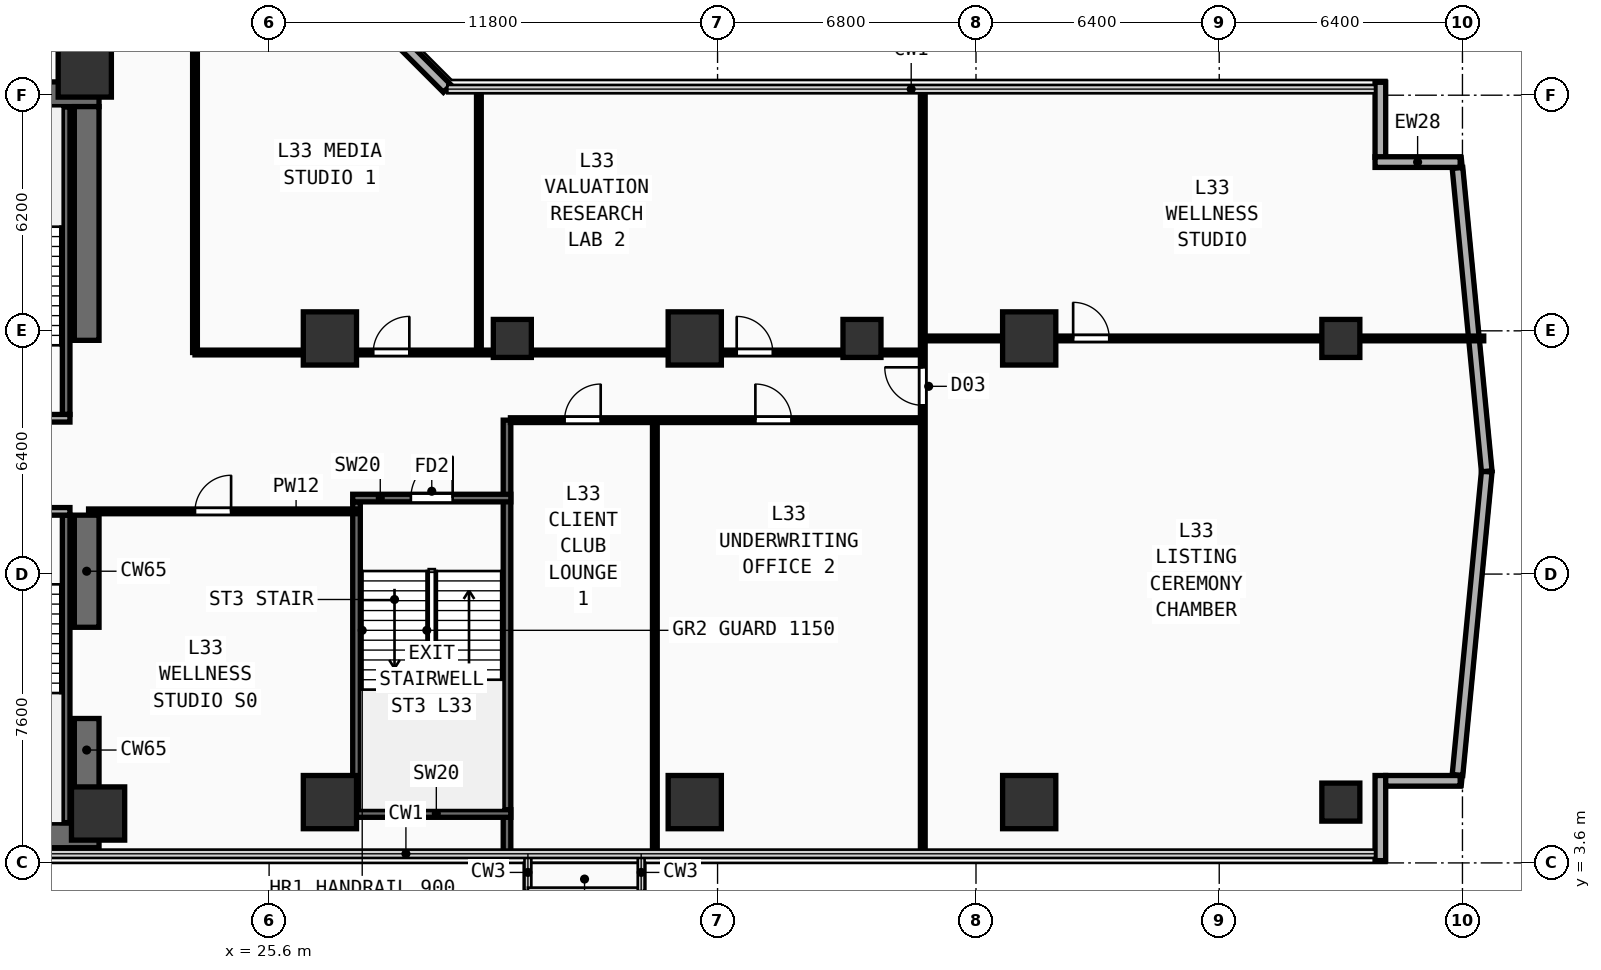
"""IFC4 building model, lengths in metres.
Left out: names, types, materials, properties, quantities, classifications, styles, units other than length and angle.
Written with IfcOpenShell. Run it as: python <this file> out.ifc"""

import sys

from ifc_helpers import new_model, si_unit, direction, frame, frame_2d, origin, origin_2d, place, context, subcontext, project, spatial, rectangle, extrude, element, fill, save


model = new_model("IFC4")
c1 = context("Model", 3, precision=1e-05, world=origin(), true_north=direction((0.0, 1.0)))
c2 = subcontext(c1, "Body", "Model", "MODEL_VIEW")
j1 = project(units=[si_unit("LENGTHUNIT", "METRE"), si_unit("PLANEANGLEUNIT", "RADIAN")], contexts=[c1])
p1 = place(None, origin())
s1 = spatial("IfcSite", under=j1, at=p1, CompositionType="ELEMENT")
p2 = place(p1, origin())
s2 = spatial("IfcBuilding", under=s1, at=p2, CompositionType="ELEMENT")
p3 = place(p2, frame((0.0, 0.0, 129.7)))
s3 = spatial("IfcBuildingStorey", under=s2, at=p3, CompositionType="ELEMENT", Elevation=129.7)
for number, where, z_axis, x_axis in (
    (1, (7.125, 4.325, 0.0), (0.0, 0.0, 1.0), (1.0, 0.0, 0.0)),
    (2, (7.125, 23.825, 0.0), (0.0, 0.0, 1.0), (1.0, 0.0, 0.0)),
):
    element("IfcWall", number, at=place(p3, frame(where, z_axis=z_axis, x_axis=x_axis)), inside=s3, PredefinedType="SHEAR", context=c2, shape_type="SweptSolid", body=[
        extrude(rectangle(XDim=14.0, YDim=0.65, at=frame_2d((7.0, 0.0))), origin(), (0.0, 0.0, 1.0), 3.54),
    ])
p4 = place(p3, frame((20.8, 4.65, 0.0), z_axis=(0.0, 0.0, 1.0), x_axis=(0.0, 1.0, 0.0)))
e3 = element("IfcWall", 3, at=p4, inside=s3, PredefinedType="SHEAR", context=c2, shape_type="SweptSolid", body=[
    extrude(rectangle(XDim=2.75, YDim=0.65, at=frame_2d((1.375, 0.0))), origin(), (0.0, 0.0, 1.0), 3.54),
])
p5 = place(p3, frame((20.8, 9.8, 0.0), z_axis=(0.0, 0.0, 1.0), x_axis=(0.0, 1.0, 0.0)))
e4 = element("IfcWall", 4, at=p5, inside=s3, PredefinedType="SHEAR", context=c2, shape_type="SweptSolid", body=[
    extrude(rectangle(XDim=2.95, YDim=0.65, at=frame_2d((1.475, 0.0))), origin(), (0.0, 0.0, 1.0), 3.54),
])
p6 = place(p3, frame((20.8, 17.35, 0.0), z_axis=(0.0, 0.0, 1.0), x_axis=(0.0, 1.0, 0.0)))
e5 = element("IfcWall", 5, at=p6, inside=s3, PredefinedType="SHEAR", context=c2, shape_type="SweptSolid", body=[
    extrude(rectangle(XDim=6.15, YDim=0.65, at=frame_2d((3.075, 0.0))), origin(), (0.0, 0.0, 1.0), 3.54),
])
for number, where, z_axis, x_axis in (
    (6, (21.1, 4.9, 0.0), (0.0, 0.0, 1.0), (1.0, 0.0, 0.0)),
    (7, (20.75, 24.45, 0.0), (0.0, 0.0, 1.0), (1.0, 0.0, 0.0)),
    (8, (27.2, 5.2, 0.0), (0.0, 0.0, 1.0), (1.0, 0.0, 0.0)),
    (9, (36.8, 5.2, 0.0), (0.0, 0.0, 1.0), (1.0, 0.0, 0.0)),
    (10, (45.6, 5.2, 0.0), (0.0, 0.0, 1.0), (1.0, 0.0, 0.0)),
    (11, (27.2, 17.4, 0.0), (0.0, 0.0, 1.0), (1.0, 0.0, 0.0)),
    (12, (36.8, 17.4, 0.0), (0.0, 0.0, 1.0), (1.0, 0.0, 0.0)),
    (13, (45.6, 17.4, 0.0), (0.0, 0.0, 1.0), (1.0, 0.0, 0.0)),
):
    element("IfcColumn", number, at=place(p3, frame(where, z_axis=z_axis, x_axis=x_axis)), inside=s3, PredefinedType="COLUMN", context=c2, shape_type="SweptSolid", body=[
        extrude(rectangle(XDim=1.4, YDim=1.4, at=origin_2d()), origin(), (0.0, 0.0, 1.0), 3.54),
    ])
for number, where, z_axis, x_axis in (
    (14, (53.8, 5.2, 0.0), (0.0, 0.0, 1.0), (1.0, 0.0, 0.0)),
    (15, (53.8, 17.4, 0.0), (0.0, 0.0, 1.0), (1.0, 0.0, 0.0)),
    (16, (32.0, 17.4, 0.0), (0.0, 0.0, 1.0), (1.0, 0.0, 0.0)),
    (17, (41.2, 17.4, 0.0), (0.0, 0.0, 1.0), (1.0, 0.0, 0.0)),
):
    element("IfcColumn", number, at=place(p3, frame(where, z_axis=z_axis, x_axis=x_axis)), inside=s3, PredefinedType="COLUMN", context=c2, shape_type="SweptSolid", body=[
        extrude(rectangle(XDim=1.0, YDim=1.0, at=origin_2d()), origin(), (0.0, 0.0, 1.0), 3.54),
    ])
p7 = place(p3, frame((54.84, 3.66, 0.0), z_axis=(0.0, 0.0, 1.0), x_axis=(0.0, 1.0, 0.0)))
e18 = element("IfcWall", 18, at=p7, inside=s3, PredefinedType="SOLIDWALL", context=c2, shape_type="SweptSolid", body=[
    extrude(rectangle(XDim=2.24, YDim=0.28, at=frame_2d((1.12, 0.0))), origin(), (0.0, 0.0, 1.0), 3.54),
])
p8 = place(p3, frame((54.98, 5.76, 0.0), z_axis=(0.0, 0.0, 1.0), x_axis=(1.0, 0.0, 0.0)))
e19 = element("IfcWall", 19, at=p8, inside=s3, PredefinedType="SOLIDWALL", context=c2, shape_type="SweptSolid", body=[
    extrude(rectangle(XDim=1.96, YDim=0.28, at=frame_2d((0.98, 0.0))), origin(), (0.0, 0.0, 1.0), 3.54),
])
p9 = place(p3, frame((54.84, 22.165, 0.0), z_axis=(0.0, 0.0, 1.0), x_axis=(0.0, 1.0, 0.0)))
e20 = element("IfcWall", 20, at=p9, inside=s3, PredefinedType="SOLIDWALL", context=c2, shape_type="SweptSolid", body=[
    extrude(rectangle(XDim=1.975, YDim=0.28, at=frame_2d((0.987, 0.0))), origin(), (0.0, 0.0, 1.0), 3.54),
])
p10 = place(p3, frame((54.7, 22.04, 0.0), z_axis=(0.0, 0.0, 1.0), x_axis=(1.0, 0.0, 0.0)))
e21 = element("IfcWall", 21, at=p10, inside=s3, PredefinedType="SOLIDWALL", context=c2, shape_type="SweptSolid", body=[
    extrude(rectangle(XDim=2.24, YDim=0.28, at=frame_2d((1.12, 0.0))), origin(), (0.0, 0.0, 1.0), 3.54),
])
p11 = place(p3, frame((30.285, 23.975, 0.0), z_axis=(0.0, 0.0, 1.0), x_axis=(-0.707106781187, 0.707106781187, 0.0)))
e22 = element("IfcWall", 22, at=p11, inside=s3, PredefinedType="SOLIDWALL", context=c2, shape_type="SweptSolid", body=[
    extrude(rectangle(XDim=9.207, YDim=0.28, at=frame_2d((4.603, 0.0))), origin(), (0.0, 0.0, 1.0), 3.54),
])
for number, where, z_axis, x_axis in (
    (23, (56.869, 5.914, 0.0), (0.0, 0.0, 1.0), (0.096, 0.995, 0.0)),
    (24, (57.639, 13.905, 0.0), (0.0, 0.0, 1.0), (-0.096, 0.995, 0.0)),
):
    element("IfcWall", number, at=place(p3, frame(where, z_axis=z_axis, x_axis=x_axis)), inside=s3, PredefinedType="SOLIDWALL", context=c2, shape_type="SweptSolid", body=[
        extrude(rectangle(XDim=8.019, YDim=0.28, at=frame_2d((4.009, 0.0))), origin(), (0.0, 0.0, 1.0), 3.54),
    ])
p12 = place(p3, frame((20.26, 4.66, 0.0), z_axis=(0.0, 0.0, 1.0), x_axis=(0.0, 1.0, 0.0)))
e25 = element("IfcWall", 25, at=p12, inside=s3, PredefinedType="SHEAR", context=c2, shape_type="SweptSolid", body=[
    extrude(rectangle(XDim=8.09, YDim=0.2, at=frame_2d((4.045, 0.0))), origin(), (0.0, 0.0, 1.0), 3.54),
])
p13 = place(p3, frame((16.4, 12.85, 0.0), z_axis=(0.0, 0.0, 1.0), x_axis=(1.0, 0.0, 0.0)))
e26 = element("IfcWall", 26, at=p13, inside=s3, PredefinedType="PARTITIONING", context=c2, shape_type="SweptSolid", body=[
    extrude(rectangle(XDim=3.96, YDim=0.2, at=frame_2d((1.98, 0.0))), origin(), (0.0, 0.0, 1.0), 3.54),
])
p14 = place(p13, frame((1.304, 0.0, 0.0)))
e27 = element("IfcOpeningElement", 27, at=p14, cuts=e26, PredefinedType="OPENING", context=c2, shape_type="SweptSolid", body=[
    extrude(rectangle(XDim=1.1, YDim=2.2, at=frame_2d((0.55, 1.1))), frame((0.0, 0.11, 0.0), z_axis=(0.0, -1.0, 0.0), x_axis=(1.0, 0.0, 0.0)), (0.0, 0.0, 1.0), 0.22),
])
p15 = place(p3, frame((20.26, 15.4, 0.0), z_axis=(0.0, 0.0, 1.0), x_axis=(0.0, 1.0, 0.0)))
e28 = element("IfcWall", 28, at=p15, inside=s3, PredefinedType="SHEAR", context=c2, shape_type="SweptSolid", body=[
    extrude(rectangle(XDim=8.09, YDim=0.2, at=frame_2d((4.045, 0.0))), origin(), (0.0, 0.0, 1.0), 3.54),
])
p16 = place(p3, frame((16.41, 15.3, 0.0), z_axis=(0.0, 0.0, 1.0), x_axis=(1.0, 0.0, 0.0)))
e29 = element("IfcWall", 29, at=p16, inside=s3, PredefinedType="PARTITIONING", context=c2, shape_type="SweptSolid", body=[
    extrude(rectangle(XDim=3.95, YDim=0.2, at=frame_2d((1.975, 0.0))), origin(), (0.0, 0.0, 1.0), 3.54),
])
p17 = place(p16, frame((1.294, 0.0, 0.0)))
e30 = element("IfcOpeningElement", 30, at=p17, cuts=e29, PredefinedType="OPENING", context=c2, shape_type="SweptSolid", body=[
    extrude(rectangle(XDim=1.1, YDim=2.2, at=frame_2d((0.55, 1.1))), frame((0.0, 0.11, 0.0), z_axis=(0.0, -1.0, 0.0), x_axis=(1.0, 0.0, 0.0)), (0.0, 0.0, 1.0), 0.22),
])
p18 = place(p3, frame((27.9, 5.0, 0.0), z_axis=(0.0, 0.0, 1.0), x_axis=(0.0, 1.0, 0.0)))
e31 = element("IfcWall", 31, at=p18, inside=s3, PredefinedType="SHEAR", context=c2, shape_type="SweptSolid", body=[
    extrude(rectangle(XDim=8.1, YDim=0.2, at=frame_2d((4.05, 0.0))), origin(), (0.0, 0.0, 1.0), 3.54),
])
p19 = place(p3, frame((31.86, 3.84, 0.0), z_axis=(0.0, 0.0, 1.0), x_axis=(0.0, 1.0, 0.0)))
e32 = element("IfcWall", 32, at=p19, inside=s3, PredefinedType="SHEAR", context=c2, shape_type="SweptSolid", body=[
    extrude(rectangle(XDim=11.41, YDim=0.2, at=frame_2d((5.705, 0.0))), origin(), (0.0, 0.0, 1.0), 3.54),
])
p20 = place(p3, frame((27.8, 4.9, 0.0), z_axis=(0.0, 0.0, 1.0), x_axis=(1.0, 0.0, 0.0)))
e33 = element("IfcWall", 33, at=p20, inside=s3, PredefinedType="SHEAR", context=c2, shape_type="SweptSolid", body=[
    extrude(rectangle(XDim=4.16, YDim=0.2, at=frame_2d((2.08, 0.0))), origin(), (0.0, 0.0, 1.0), 3.54),
])
p21 = place(p3, frame((27.8, 13.2, 0.0), z_axis=(0.0, 0.0, 1.0), x_axis=(1.0, 0.0, 0.0)))
e34 = element("IfcWall", 34, at=p21, inside=s3, PredefinedType="SHEAR", context=c2, shape_type="SweptSolid", body=[
    extrude(rectangle(XDim=4.16, YDim=0.2, at=frame_2d((2.08, 0.0))), origin(), (0.0, 0.0, 1.0), 3.54),
])
p22 = place(p21, frame((1.53, 0.0, 0.0)))
e35 = element("IfcOpeningElement", 35, at=p22, cuts=e34, PredefinedType="OPENING", context=c2, shape_type="SweptSolid", body=[
    extrude(rectangle(XDim=1.1, YDim=2.2, at=frame_2d((0.55, 1.1))), frame((0.0, 0.11, 0.0), z_axis=(0.0, -1.0, 0.0), x_axis=(1.0, 0.0, 0.0)), (0.0, 0.0, 1.0), 0.22),
])
p23 = place(p3, frame((20.85, 12.85, 0.0), z_axis=(0.0, 0.0, 1.0), x_axis=(1.0, 0.0, 0.0)))
e36 = element("IfcWall", 36, at=p23, inside=s3, PredefinedType="PARTITIONING", context=c2, shape_type="SweptSolid", body=[
    extrude(rectangle(XDim=7.05, YDim=0.125, at=frame_2d((3.525, 0.0))), origin(), (0.0, 0.0, 1.0), 3.54),
])
p24 = place(p23, frame((2.8, 0.0, 0.0)))
e37 = element("IfcOpeningElement", 37, at=p24, cuts=e36, PredefinedType="OPENING", context=c2, shape_type="SweptSolid", body=[
    extrude(rectangle(XDim=0.95, YDim=2.15, at=frame_2d((0.475, 1.075))), frame((0.0, 0.073, 0.0), z_axis=(0.0, -1.0, 0.0), x_axis=(1.0, 0.0, 0.0)), (0.0, 0.0, 1.0), 0.145),
])
p25 = place(p3, frame((31.95, 15.25, 0.0), z_axis=(0.0, 0.0, 1.0), x_axis=(1.0, 0.0, 0.0)))
e38 = element("IfcWall", 38, at=p25, inside=s3, PredefinedType="PARTITIONING", context=c2, shape_type="SweptSolid", body=[
    extrude(rectangle(XDim=10.85, YDim=0.125, at=frame_2d((5.425, 0.0))), origin(), (0.0, 0.0, 1.0), 3.09),
])
p26 = place(p25, frame((1.425, 0.0, 0.0)))
e39 = element("IfcOpeningElement", 39, at=p26, cuts=e38, PredefinedType="OPENING", context=c2, shape_type="SweptSolid", body=[
    extrude(rectangle(XDim=0.95, YDim=2.15, at=frame_2d((0.475, 1.075))), frame((0.0, 0.073, 0.0), z_axis=(0.0, -1.0, 0.0), x_axis=(1.0, 0.0, 0.0)), (0.0, 0.0, 1.0), 0.145),
])
p27 = place(p25, frame((6.445, 0.0, 0.0)))
e40 = element("IfcOpeningElement", 40, at=p27, cuts=e38, PredefinedType="OPENING", context=c2, shape_type="SweptSolid", body=[
    extrude(rectangle(XDim=0.95, YDim=2.15, at=frame_2d((0.475, 1.075))), frame((0.0, 0.073, 0.0), z_axis=(0.0, -1.0, 0.0), x_axis=(1.0, 0.0, 0.0)), (0.0, 0.0, 1.0), 0.145),
])
p28 = place(p3, frame((35.75, 3.84, 0.0), z_axis=(0.0, 0.0, 1.0), x_axis=(0.0, 1.0, 0.0)))
e41 = element("IfcWall", 41, at=p28, inside=s3, PredefinedType="PARTITIONING", context=c2, shape_type="SweptSolid", body=[
    extrude(rectangle(XDim=11.41, YDim=0.125, at=frame_2d((5.705, 0.0))), origin(), (0.0, 0.0, 1.0), 3.54),
])
p29 = place(p3, frame((42.8, 3.84, 0.0), z_axis=(0.0, 0.0, 1.0), x_axis=(0.0, 1.0, 0.0)))
e42 = element("IfcWall", 42, at=p29, inside=s3, PredefinedType="PARTITIONING", context=c2, shape_type="SweptSolid", body=[
    extrude(rectangle(XDim=20.12, YDim=0.125, at=frame_2d((10.06, 0.0))), origin(), (0.0, 0.0, 1.0), 3.54),
])
p30 = place(p29, frame((11.8, 0.0, 0.0)))
e43 = element("IfcOpeningElement", 43, at=p30, cuts=e42, PredefinedType="OPENING", context=c2, shape_type="SweptSolid", body=[
    extrude(rectangle(XDim=1.0, YDim=2.2, at=frame_2d((0.5, 1.1))), frame((0.0, 0.073, 0.0), z_axis=(0.0, -1.0, 0.0), x_axis=(1.0, 0.0, 0.0)), (0.0, 0.0, 1.0), 0.145),
])
p31 = place(p3, frame((42.8, 17.4, 0.0), z_axis=(0.0, 0.0, 1.0), x_axis=(1.0, 0.0, 0.0)))
e44 = element("IfcWall", 44, at=p31, inside=s3, PredefinedType="PARTITIONING", context=c2, shape_type="SweptSolid", body=[
    extrude(rectangle(XDim=14.76, YDim=0.125, at=frame_2d((7.38, 0.0))), origin(), (0.0, 0.0, 1.0), 3.24),
])
p32 = place(p31, frame((3.956, 0.0, 0.0)))
e45 = element("IfcOpeningElement", 45, at=p32, cuts=e44, PredefinedType="OPENING", context=c2, shape_type="SweptSolid", body=[
    extrude(rectangle(XDim=0.95, YDim=2.15, at=frame_2d((0.475, 1.075))), frame((0.0, 0.073, 0.0), z_axis=(0.0, -1.0, 0.0), x_axis=(1.0, 0.0, 0.0)), (0.0, 0.0, 1.0), 0.145),
])
p33 = place(p3, frame((23.65, 17.03, 0.0), z_axis=(0.0, 0.0, 1.0), x_axis=(0.0, 1.0, 0.0)))
e46 = element("IfcWall", 46, at=p33, inside=s3, PredefinedType="PARTITIONING", context=c2, shape_type="SweptSolid", body=[
    extrude(rectangle(XDim=9.17, YDim=0.125, at=frame_2d((4.585, 0.0))), origin(), (0.0, 0.0, 1.0), 3.54),
])
p34 = place(p3, frame((23.65, 17.03, 0.0), z_axis=(0.0, 0.0, 1.0), x_axis=(1.0, 0.0, 0.0)))
e47 = element("IfcWall", 47, at=p34, inside=s3, PredefinedType="PARTITIONING", context=c2, shape_type="SweptSolid", body=[
    extrude(rectangle(XDim=19.15, YDim=0.125, at=frame_2d((9.575, 0.0))), origin(), (0.0, 0.0, 1.0), 3.24),
])
p35 = place(p34, frame((4.69, 0.0, 0.0)))
e48 = element("IfcOpeningElement", 48, at=p35, cuts=e47, PredefinedType="OPENING", context=c2, shape_type="SweptSolid", body=[
    extrude(rectangle(XDim=0.95, YDim=2.15, at=frame_2d((0.475, 1.075))), frame((0.0, 0.073, 0.0), z_axis=(0.0, -1.0, 0.0), x_axis=(1.0, 0.0, 0.0)), (0.0, 0.0, 1.0), 0.145),
])
p36 = place(p34, frame((14.254, 0.0, 0.0)))
e49 = element("IfcOpeningElement", 49, at=p36, cuts=e47, PredefinedType="OPENING", context=c2, shape_type="SweptSolid", body=[
    extrude(rectangle(XDim=0.95, YDim=2.15, at=frame_2d((0.475, 1.075))), frame((0.0, 0.073, 0.0), z_axis=(0.0, -1.0, 0.0), x_axis=(1.0, 0.0, 0.0)), (0.0, 0.0, 1.0), 0.145),
])
p37 = place(p3, frame((31.12, 17.03, 0.0), z_axis=(0.0, 0.0, 1.0), x_axis=(0.0, 1.0, 0.0)))
e50 = element("IfcWall", 50, at=p37, inside=s3, PredefinedType="PARTITIONING", context=c2, shape_type="SweptSolid", body=[
    extrude(rectangle(XDim=6.93, YDim=0.125, at=frame_2d((3.465, 0.0))), origin(), (0.0, 0.0, 1.0), 3.54),
])
p38 = place(p22, frame((1.1, 0.0, 0.0), z_axis=(0.0, 0.0, 1.0), x_axis=(-1.0, 0.0, 0.0)))
e51 = element("IfcDoor", 51, at=p38, inside=s3, OperationType="SINGLE_SWING_LEFT", PredefinedType="DOOR", context=c2, shape_type="SweptSolid", body=[
    extrude(rectangle(XDim=1.1, YDim=2.2, at=frame_2d((0.55, 1.1))), frame((0.0, 0.025, 0.0), z_axis=(0.0, -1.0, 0.0), x_axis=(1.0, 0.0, 0.0)), (0.0, 0.0, 1.0), 0.05),
])
fill(e35, e51)
p39 = place(p24, origin())
e52 = element("IfcDoor", 52, at=p39, inside=s3, OperationType="SINGLE_SWING_RIGHT", PredefinedType="DOOR", context=c2, shape_type="SweptSolid", body=[
    extrude(rectangle(XDim=0.95, YDim=2.15, at=frame_2d((0.475, 1.075))), frame((0.0, 0.025, 0.0), z_axis=(0.0, -1.0, 0.0), x_axis=(1.0, 0.0, 0.0)), (0.0, 0.0, 1.0), 0.05),
])
fill(e37, e52)
p40 = place(p26, origin())
e53 = element("IfcDoor", 53, at=p40, inside=s3, OperationType="SINGLE_SWING_RIGHT", PredefinedType="DOOR", context=c2, shape_type="SweptSolid", body=[
    extrude(rectangle(XDim=0.95, YDim=2.15, at=frame_2d((0.475, 1.075))), frame((0.0, 0.025, 0.0), z_axis=(0.0, -1.0, 0.0), x_axis=(1.0, 0.0, 0.0)), (0.0, 0.0, 1.0), 0.05),
])
fill(e39, e53)
p41 = place(p27, origin())
e54 = element("IfcDoor", 54, at=p41, inside=s3, OperationType="SINGLE_SWING_LEFT", PredefinedType="DOOR", context=c2, shape_type="SweptSolid", body=[
    extrude(rectangle(XDim=0.95, YDim=2.15, at=frame_2d((0.475, 1.075))), frame((0.0, 0.025, 0.0), z_axis=(0.0, -1.0, 0.0), x_axis=(1.0, 0.0, 0.0)), (0.0, 0.0, 1.0), 0.05),
])
fill(e40, e54)
p42 = place(p30, origin())
e55 = element("IfcDoor", 55, at=p42, inside=s3, OperationType="SINGLE_SWING_RIGHT", PredefinedType="DOOR", context=c2, shape_type="SweptSolid", body=[
    extrude(rectangle(XDim=1.0, YDim=2.2, at=frame_2d((0.5, 1.1))), frame((0.0, 0.025, 0.0), z_axis=(0.0, -1.0, 0.0), x_axis=(1.0, 0.0, 0.0)), (0.0, 0.0, 1.0), 0.05),
])
fill(e43, e55)
p43 = place(p32, origin())
e56 = element("IfcDoor", 56, at=p43, inside=s3, OperationType="SINGLE_SWING_LEFT", PredefinedType="DOOR", context=c2, shape_type="SweptSolid", body=[
    extrude(rectangle(XDim=0.95, YDim=2.15, at=frame_2d((0.475, 1.075))), frame((0.0, 0.025, 0.0), z_axis=(0.0, -1.0, 0.0), x_axis=(1.0, 0.0, 0.0)), (0.0, 0.0, 1.0), 0.05),
])
fill(e45, e56)
p44 = place(p35, origin())
e57 = element("IfcDoor", 57, at=p44, inside=s3, OperationType="SINGLE_SWING_RIGHT", PredefinedType="DOOR", context=c2, shape_type="SweptSolid", body=[
    extrude(rectangle(XDim=0.95, YDim=2.15, at=frame_2d((0.475, 1.075))), frame((0.0, 0.025, 0.0), z_axis=(0.0, -1.0, 0.0), x_axis=(1.0, 0.0, 0.0)), (0.0, 0.0, 1.0), 0.05),
])
fill(e48, e57)
p45 = place(p36, origin())
e58 = element("IfcDoor", 58, at=p45, inside=s3, OperationType="SINGLE_SWING_LEFT", PredefinedType="DOOR", context=c2, shape_type="SweptSolid", body=[
    extrude(rectangle(XDim=0.95, YDim=2.15, at=frame_2d((0.475, 1.075))), frame((0.0, 0.025, 0.0), z_axis=(0.0, -1.0, 0.0), x_axis=(1.0, 0.0, 0.0)), (0.0, 0.0, 1.0), 0.05),
])
fill(e49, e58)
save(model, sys.argv[1])
